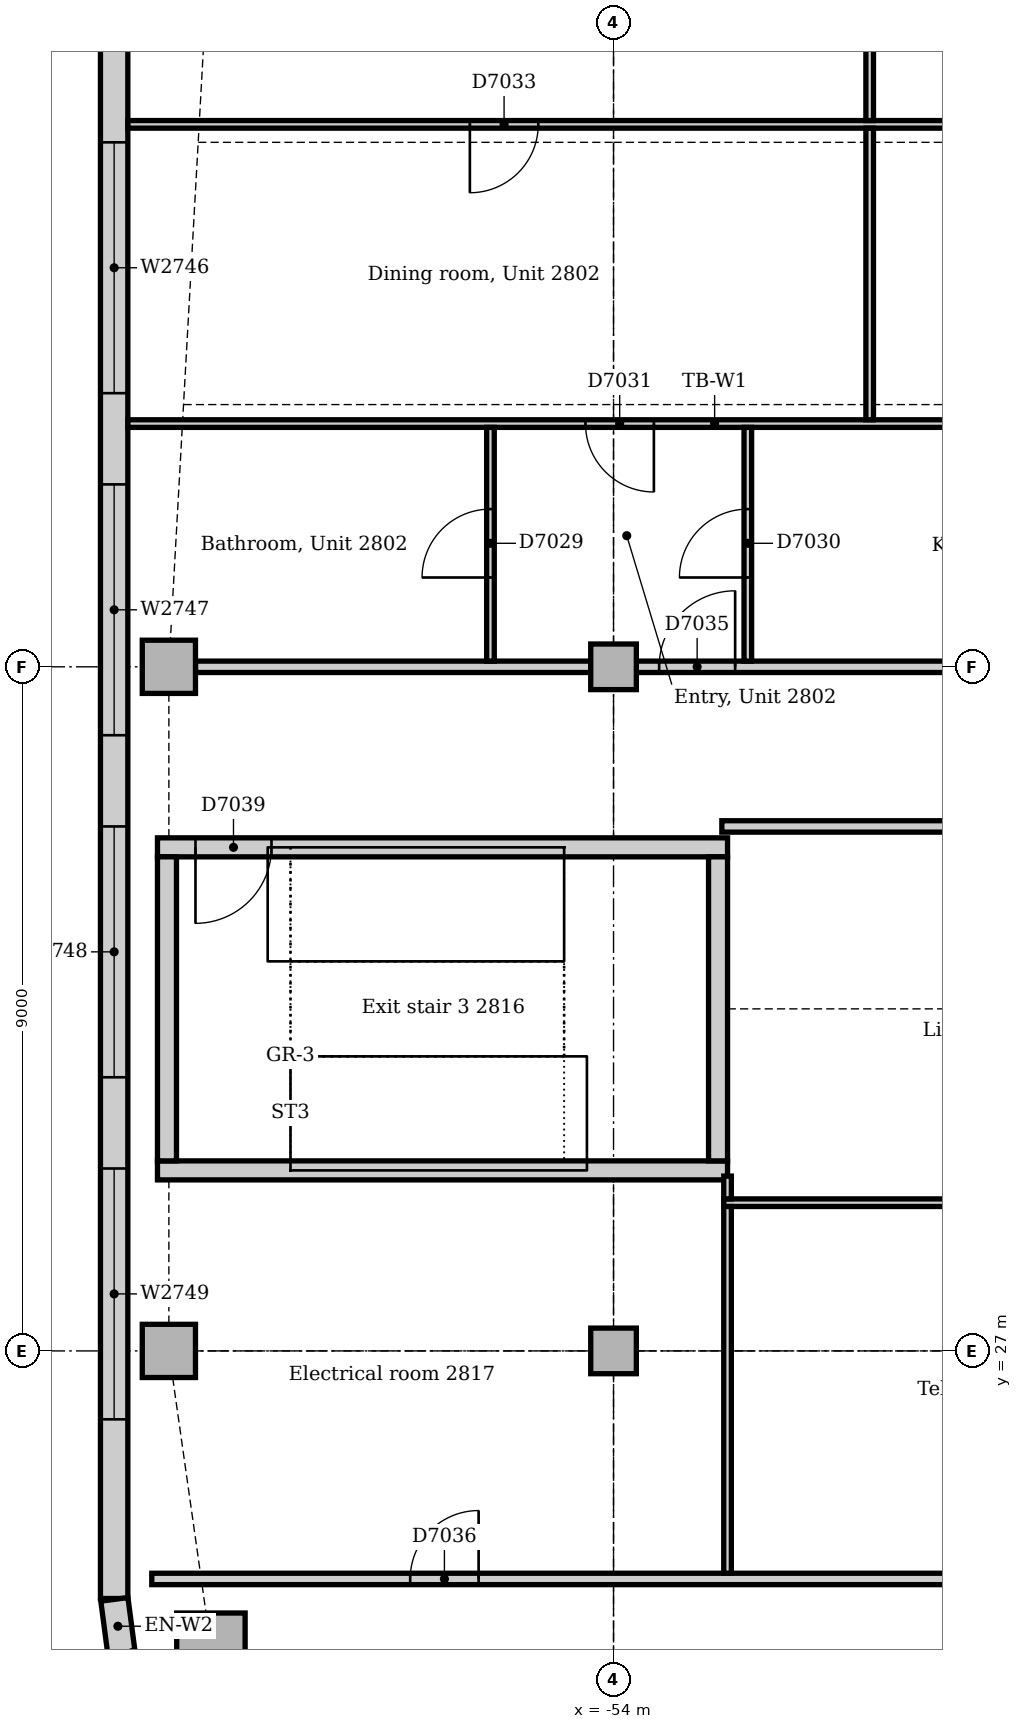
"""IFC4 building model, lengths in metres.
Left out: names, types, materials, properties, quantities, classifications, styles, units other than length and angle.
Written with IfcOpenShell. Run it as: python <this file> out.ifc"""

import sys

from ifc_helpers import new_model, si_unit, direction, frame, frame_2d, origin, origin_2d, place, context, subcontext, project, spatial, rectangle, extrude, element, fill, save


model = new_model("IFC4")
c1 = context("Model", 3, precision=1e-05, world=origin(), true_north=direction((0.0, 1.0)))
c2 = subcontext(c1, "Body", "Model", "MODEL_VIEW")
j1 = project(units=[si_unit("LENGTHUNIT", "METRE"), si_unit("PLANEANGLEUNIT", "RADIAN")], contexts=[c1])
p1 = place(None, origin())
s1 = spatial("IfcSite", under=j1, at=p1, CompositionType="ELEMENT")
p2 = place(p1, origin())
s2 = spatial("IfcBuilding", under=s1, at=p2, CompositionType="ELEMENT")
p3 = place(p2, frame((0.0, 0.0, 120.0)))
s3 = spatial("IfcBuildingStorey", under=s2, at=p3, CompositionType="ELEMENT", Elevation=120.0)
p4 = place(p3, frame((-60.0, 29.375, 0.0), z_axis=(0.0, 0.0, 1.0), x_axis=(1.0, 0.0, 0.0)))
e1 = element("IfcWall", 1, at=p4, inside=s3, PredefinedType="SOLIDWALL", context=c2, shape_type="SweptSolid", body=[
    extrude(rectangle(XDim=7.5, YDim=0.25, at=frame_2d((3.75, 0.0))), origin(), (0.0, 0.0, 1.0), 4.0),
])
p5 = place(p3, frame((-52.5, 33.625, 0.0), z_axis=(0.0, 0.0, 1.0), x_axis=(-1.0, 0.0, 0.0)))
e2 = element("IfcWall", 2, at=p5, inside=s3, PredefinedType="SOLIDWALL", context=c2, shape_type="SweptSolid", body=[
    extrude(rectangle(XDim=7.5, YDim=0.25, at=frame_2d((3.75, 0.0))), origin(), (0.0, 0.0, 1.0), 4.0),
])
p6 = place(p5, frame((6.0, 0.0, 0.0)))
e3 = element("IfcOpeningElement", 3, at=p6, cuts=e2, PredefinedType="OPENING", context=c2, shape_type="SweptSolid", body=[
    extrude(rectangle(XDim=1.0, YDim=2.1, at=frame_2d((0.5, 1.05))), frame((0.0, 0.135, 0.0), z_axis=(0.0, -1.0, 0.0), x_axis=(1.0, 0.0, 0.0)), (0.0, 0.0, 1.0), 0.27),
])
for number, where, z_axis, x_axis in (
    (4, (-52.625, 29.5, 0.0), (0.0, 0.0, 1.0), (0.0, 1.0, 0.0)),
    (5, (-59.875, 33.5, 0.0), (0.0, 0.0, 1.0), (0.0, -1.0, 0.0)),
):
    element("IfcWall", number, at=place(p3, frame(where, z_axis=z_axis, x_axis=x_axis)), inside=s3, PredefinedType="SOLIDWALL", context=c2, shape_type="SweptSolid", body=[
        extrude(rectangle(XDim=4.0, YDim=0.25, at=frame_2d((2.0, 0.0))), origin(), (0.0, 0.0, 1.0), 4.0),
    ])
p7 = place(p3, frame((-59.297, 23.102, 0.0), z_axis=(0.0, 0.0, 1.0), x_axis=(1.0, 0.0, 0.0)))
e6 = element("IfcColumn", 6, at=p7, inside=s3, PredefinedType="COLUMN", context=c2, shape_type="SweptSolid", body=[
    extrude(rectangle(XDim=0.9, YDim=0.9, at=origin_2d()), origin(), (0.0, 0.0, 1.0), 3.85),
])
for number, where, z_axis, x_axis in (
    (7, (-59.85, 27.0, 0.0), (0.0, 0.0, 1.0), (1.0, 0.0, 0.0)),
    (8, (-59.85, 36.0, 0.0), (0.0, 0.0, 1.0), (1.0, 0.0, 0.0)),
):
    element("IfcColumn", number, at=place(p3, frame(where, z_axis=z_axis, x_axis=x_axis)), inside=s3, PredefinedType="COLUMN", context=c2, shape_type="SweptSolid", body=[
        extrude(rectangle(XDim=0.7, YDim=0.7, at=origin_2d()), origin(), (0.0, 0.0, 1.0), 3.85),
    ])
for number, where, z_axis, x_axis in (
    (9, (-54.0, 27.0, 0.0), (0.0, 0.0, 1.0), (1.0, 0.0, 0.0)),
    (10, (-54.0, 36.0, 0.0), (0.0, 0.0, 1.0), (1.0, 0.0, 0.0)),
):
    element("IfcColumn", number, at=place(p3, frame(where, z_axis=z_axis, x_axis=x_axis)), inside=s3, PredefinedType="COLUMN", context=c2, shape_type="SweptSolid", body=[
        extrude(rectangle(XDim=0.6, YDim=0.6, at=origin_2d()), origin(), (0.0, 0.0, 1.0), 3.85),
    ])
p8 = place(p3, frame((-60.57, 45.257, 0.0), z_axis=(0.0, 0.0, 1.0), x_axis=(0.0, -1.0, 0.0)))
e11 = element("IfcWall", 11, at=p8, inside=s3, PredefinedType="STANDARD", context=c2, shape_type="SweptSolid", body=[
    extrude(rectangle(XDim=21.515, YDim=0.36, at=frame_2d((10.757, 0.0))), origin(), (0.0, 0.0, 1.0), 3.85),
])
p9 = place(p8, frame((2.357, 0.0, 0.9)))
e12 = element("IfcOpeningElement", 12, at=p9, cuts=e11, PredefinedType="OPENING", context=c2, shape_type="SweptSolid", body=[
    extrude(rectangle(XDim=3.3, YDim=1.6, at=frame_2d((1.65, 0.8))), frame((0.0, 0.19, 0.0), z_axis=(0.0, -1.0, 0.0), x_axis=(1.0, 0.0, 0.0)), (0.0, 0.0, 1.0), 0.38),
])
p10 = place(p8, frame((6.857, 0.0, 0.9)))
e13 = element("IfcOpeningElement", 13, at=p10, cuts=e11, PredefinedType="OPENING", context=c2, shape_type="SweptSolid", body=[
    extrude(rectangle(XDim=3.3, YDim=1.6, at=frame_2d((1.65, 0.8))), frame((0.0, 0.19, 0.0), z_axis=(0.0, -1.0, 0.0), x_axis=(1.0, 0.0, 0.0)), (0.0, 0.0, 1.0), 0.38),
])
p11 = place(p8, frame((11.357, 0.0, 0.9)))
e14 = element("IfcOpeningElement", 14, at=p11, cuts=e11, PredefinedType="OPENING", context=c2, shape_type="SweptSolid", body=[
    extrude(rectangle(XDim=3.3, YDim=1.6, at=frame_2d((1.65, 0.8))), frame((0.0, 0.19, 0.0), z_axis=(0.0, -1.0, 0.0), x_axis=(1.0, 0.0, 0.0)), (0.0, 0.0, 1.0), 0.38),
])
p12 = place(p8, frame((15.857, 0.0, 0.9)))
e15 = element("IfcOpeningElement", 15, at=p12, cuts=e11, PredefinedType="OPENING", context=c2, shape_type="SweptSolid", body=[
    extrude(rectangle(XDim=3.3, YDim=1.6, at=frame_2d((1.65, 0.8))), frame((0.0, 0.19, 0.0), z_axis=(0.0, -1.0, 0.0), x_axis=(1.0, 0.0, 0.0)), (0.0, 0.0, 1.0), 0.38),
])
p13 = place(p3, frame((-60.567, 23.731, 0.0), z_axis=(0.0, 0.0, 1.0), x_axis=(0.13055608231, -0.99144092581, 0.0)))
e16 = element("IfcWall", 16, at=p13, inside=s3, PredefinedType="STANDARD", context=c2, shape_type="SweptSolid", body=[
    extrude(rectangle(XDim=0.713, YDim=0.36, at=frame_2d((0.356, 0.0))), origin(), (0.0, 0.0, 1.0), 3.85),
])
p14 = place(p3, frame((-53.7, 36.0, 0.0), z_axis=(0.0, 0.0, 1.0), x_axis=(1.0, 0.0, 0.0)))
e17 = element("IfcWall", 17, at=p14, inside=s3, PredefinedType="PARTITIONING", context=c2, shape_type="SweptSolid", body=[
    extrude(rectangle(XDim=8.4, YDim=0.15, at=frame_2d((4.2, 0.0))), origin(), (0.0, 0.0, 1.0), 3.262),
])
p15 = place(p14, frame((0.3, 0.0, 0.0)))
e18 = element("IfcOpeningElement", 18, at=p15, cuts=e17, PredefinedType="OPENING", context=c2, shape_type="SweptSolid", body=[
    extrude(rectangle(XDim=1.0, YDim=2.1, at=frame_2d((0.5, 1.05))), frame((0.0, 0.085, 0.0), z_axis=(0.0, -1.0, 0.0), x_axis=(1.0, 0.0, 0.0)), (0.0, 0.0, 1.0), 0.17),
])
p16 = place(p3, frame((-59.5, 36.0, 0.0), z_axis=(0.0, 0.0, 1.0), x_axis=(1.0, 0.0, 0.0)))
e19 = element("IfcWall", 19, at=p16, inside=s3, PredefinedType="PARTITIONING", context=c2, shape_type="SweptSolid", body=[
    extrude(rectangle(XDim=5.2, YDim=0.15, at=frame_2d((2.6, 0.0))), origin(), (0.0, 0.0, 1.0), 3.35),
])
p17 = place(p3, frame((-60.075, 24.0, 0.0), z_axis=(0.0, 0.0, 1.0), x_axis=(1.0, 0.0, 0.0)))
e20 = element("IfcWall", 20, at=p17, inside=s3, PredefinedType="PARTITIONING", context=c2, shape_type="SweptSolid", body=[
    extrude(rectangle(XDim=15.15, YDim=0.15, at=frame_2d((7.575, 0.0))), origin(), (0.0, 0.0, 1.0), 3.85),
])
p18 = place(p17, frame((3.4, 0.0, 0.0)))
e21 = element("IfcOpeningElement", 21, at=p18, cuts=e20, PredefinedType="OPENING", context=c2, shape_type="SweptSolid", body=[
    extrude(rectangle(XDim=0.9, YDim=2.1, at=frame_2d((0.45, 1.05))), frame((0.0, 0.085, 0.0), z_axis=(0.0, -1.0, 0.0), x_axis=(1.0, 0.0, 0.0)), (0.0, 0.0, 1.0), 0.17),
])
p19 = place(p3, frame((-52.575, 33.9, 0.0), z_axis=(0.0, 0.0, 1.0), x_axis=(1.0, 0.0, 0.0)))
e22 = element("IfcWall", 22, at=p19, inside=s3, PredefinedType="PARTITIONING", context=c2, shape_type="SweptSolid", body=[
    extrude(rectangle(XDim=7.5, YDim=0.15, at=frame_2d((3.75, 0.0))), origin(), (0.0, 0.0, 1.0), 3.85),
])
p20 = place(p19, frame((3.3, 0.0, 0.0)))
e23 = element("IfcOpeningElement", 23, at=p20, cuts=e22, PredefinedType="OPENING", context=c2, shape_type="SweptSolid", body=[
    extrude(rectangle(XDim=0.9, YDim=2.1, at=frame_2d((0.45, 1.05))), frame((0.0, 0.085, 0.0), z_axis=(0.0, -1.0, 0.0), x_axis=(1.0, 0.0, 0.0)), (0.0, 0.0, 1.0), 0.17),
])
p21 = place(p3, frame((-60.39, 39.2, 0.0), z_axis=(0.0, 0.0, 1.0), x_axis=(1.0, 0.0, 0.0)))
e24 = element("IfcWall", 24, at=p21, inside=s3, PredefinedType="PARTITIONING", context=c2, shape_type="SweptSolid", body=[
    extrude(rectangle(XDim=15.44, YDim=0.1, at=frame_2d((7.72, 0.0))), origin(), (0.0, 0.0, 1.0), 3.85),
])
p22 = place(p21, frame((6.021, 0.0, 0.0)))
e25 = element("IfcOpeningElement", 25, at=p22, cuts=e24, PredefinedType="OPENING", context=c2, shape_type="SweptSolid", body=[
    extrude(rectangle(XDim=0.9, YDim=2.1, at=frame_2d((0.45, 1.05))), frame((0.0, 0.06, 0.0), z_axis=(0.0, -1.0, 0.0), x_axis=(1.0, 0.0, 0.0)), (0.0, 0.0, 1.0), 0.12),
])
p23 = place(p3, frame((-60.39, 43.136, 0.0), z_axis=(0.0, 0.0, 1.0), x_axis=(1.0, 0.0, 0.0)))
e26 = element("IfcWall", 26, at=p23, inside=s3, PredefinedType="PARTITIONING", context=c2, shape_type="SweptSolid", body=[
    extrude(rectangle(XDim=15.44, YDim=0.1, at=frame_2d((7.72, 0.0))), origin(), (0.0, 0.0, 1.0), 3.85),
])
p24 = place(p23, frame((4.5, 0.0, 0.0)))
e27 = element("IfcOpeningElement", 27, at=p24, cuts=e26, PredefinedType="OPENING", context=c2, shape_type="SweptSolid", body=[
    extrude(rectangle(XDim=0.9, YDim=2.1, at=frame_2d((0.45, 1.05))), frame((0.0, 0.06, 0.0), z_axis=(0.0, -1.0, 0.0), x_axis=(1.0, 0.0, 0.0)), (0.0, 0.0, 1.0), 0.12),
])
p25 = place(p23, frame((12.06, 0.0, 0.0)))
e28 = element("IfcOpeningElement", 28, at=p25, cuts=e26, PredefinedType="OPENING", context=c2, shape_type="SweptSolid", body=[
    extrude(rectangle(XDim=0.9, YDim=2.1, at=frame_2d((0.45, 1.05))), frame((0.0, 0.06, 0.0), z_axis=(0.0, -1.0, 0.0), x_axis=(1.0, 0.0, 0.0)), (0.0, 0.0, 1.0), 0.12),
])
p26 = place(p3, frame((-50.63, 39.25, 0.0), z_axis=(0.0, 0.0, 1.0), x_axis=(0.0, 1.0, 0.0)))
e29 = element("IfcWall", 29, at=p26, inside=s3, PredefinedType="PARTITIONING", context=c2, shape_type="SweptSolid", body=[
    extrude(rectangle(XDim=3.837, YDim=0.1, at=frame_2d((1.918, 0.0))), origin(), (0.0, 0.0, 1.0), 3.85),
])
p27 = place(p3, frame((-50.63, 43.187, 0.0), z_axis=(0.0, 0.0, 1.0), x_axis=(0.0, 1.0, 0.0)))
e30 = element("IfcWall", 30, at=p27, inside=s3, PredefinedType="PARTITIONING", context=c2, shape_type="SweptSolid", body=[
    extrude(rectangle(XDim=5.954, YDim=0.1, at=frame_2d((2.977, 0.0))), origin(), (0.0, 0.0, 1.0), 3.85),
])
p28 = place(p27, frame((2.55, 0.0, 0.0)))
e31 = element("IfcOpeningElement", 31, at=p28, cuts=e30, PredefinedType="OPENING", context=c2, shape_type="SweptSolid", body=[
    extrude(rectangle(XDim=0.9, YDim=2.1, at=frame_2d((0.45, 1.05))), frame((0.0, 0.06, 0.0), z_axis=(0.0, -1.0, 0.0), x_axis=(1.0, 0.0, 0.0)), (0.0, 0.0, 1.0), 0.12),
])
p29 = place(p3, frame((-52.55, 28.95, 0.0), z_axis=(0.0, 0.0, 1.0), x_axis=(1.0, 0.0, 0.0)))
e32 = element("IfcWall", 32, at=p29, inside=s3, PredefinedType="PARTITIONING", context=c2, shape_type="SweptSolid", body=[
    extrude(rectangle(XDim=7.475, YDim=0.1, at=frame_2d((3.737, 0.0))), origin(), (0.0, 0.0, 1.0), 3.85),
])
p30 = place(p3, frame((-52.5, 29.0, 0.0), z_axis=(0.0, 0.0, 1.0), x_axis=(0.0, 1.0, 0.0)))
e33 = element("IfcWall", 33, at=p30, inside=s3, PredefinedType="PARTITIONING", context=c2, shape_type="SweptSolid", body=[
    extrude(rectangle(XDim=0.3, YDim=0.1, at=frame_2d((0.15, 0.0))), origin(), (0.0, 0.0, 1.0), 3.85),
])
p31 = place(p3, frame((-52.5, 24.075, 0.0), z_axis=(0.0, 0.0, 1.0), x_axis=(0.0, 1.0, 0.0)))
e34 = element("IfcWall", 34, at=p31, inside=s3, PredefinedType="PARTITIONING", context=c2, shape_type="SweptSolid", body=[
    extrude(rectangle(XDim=4.825, YDim=0.1, at=frame_2d((2.413, 0.0))), origin(), (0.0, 0.0, 1.0), 3.85),
])
p32 = place(p3, frame((-55.619, 36.075, 0.0), z_axis=(0.0, 0.0, 1.0), x_axis=(0.0, 1.0, 0.0)))
e35 = element("IfcWall", 35, at=p32, inside=s3, PredefinedType="PARTITIONING", context=c2, shape_type="SweptSolid", body=[
    extrude(rectangle(XDim=3.075, YDim=0.1, at=frame_2d((1.538, 0.0))), origin(), (0.0, 0.0, 1.0), 3.85),
])
p33 = place(p32, frame((1.1, 0.0, 0.0)))
e36 = element("IfcOpeningElement", 36, at=p33, cuts=e35, PredefinedType="OPENING", context=c2, shape_type="SweptSolid", body=[
    extrude(rectangle(XDim=0.9, YDim=2.1, at=frame_2d((0.45, 1.05))), frame((0.0, 0.06, 0.0), z_axis=(0.0, -1.0, 0.0), x_axis=(1.0, 0.0, 0.0)), (0.0, 0.0, 1.0), 0.12),
])
p34 = place(p3, frame((-52.233, 36.075, 0.0), z_axis=(0.0, 0.0, 1.0), x_axis=(0.0, 1.0, 0.0)))
e37 = element("IfcWall", 37, at=p34, inside=s3, PredefinedType="PARTITIONING", context=c2, shape_type="SweptSolid", body=[
    extrude(rectangle(XDim=3.075, YDim=0.1, at=frame_2d((1.538, 0.0))), origin(), (0.0, 0.0, 1.0), 3.85),
])
p35 = place(p34, frame((1.1, 0.0, 0.0)))
e38 = element("IfcOpeningElement", 38, at=p35, cuts=e37, PredefinedType="OPENING", context=c2, shape_type="SweptSolid", body=[
    extrude(rectangle(XDim=0.9, YDim=2.1, at=frame_2d((0.45, 1.05))), frame((0.0, 0.06, 0.0), z_axis=(0.0, -1.0, 0.0), x_axis=(1.0, 0.0, 0.0)), (0.0, 0.0, 1.0), 0.12),
])
p36 = place(p9, origin())
e39 = element("IfcWindow", 39, at=p36, inside=s3, PartitioningType="SINGLE_PANEL", PredefinedType="WINDOW", context=c2, shape_type="SweptSolid", body=[
    extrude(rectangle(XDim=3.3, YDim=1.6, at=frame_2d((1.65, 0.8))), frame((0.0, 0.13, 0.0), z_axis=(0.0, -1.0, 0.0), x_axis=(1.0, 0.0, 0.0)), (0.0, 0.0, 1.0), 0.06),
])
fill(e12, e39)
p37 = place(p10, origin())
e40 = element("IfcWindow", 40, at=p37, inside=s3, PartitioningType="SINGLE_PANEL", PredefinedType="WINDOW", context=c2, shape_type="SweptSolid", body=[
    extrude(rectangle(XDim=3.3, YDim=1.6, at=frame_2d((1.65, 0.8))), frame((0.0, 0.13, 0.0), z_axis=(0.0, -1.0, 0.0), x_axis=(1.0, 0.0, 0.0)), (0.0, 0.0, 1.0), 0.06),
])
fill(e13, e40)
p38 = place(p11, origin())
e41 = element("IfcWindow", 41, at=p38, inside=s3, PartitioningType="SINGLE_PANEL", PredefinedType="WINDOW", context=c2, shape_type="SweptSolid", body=[
    extrude(rectangle(XDim=3.3, YDim=1.6, at=frame_2d((1.65, 0.8))), frame((0.0, 0.13, 0.0), z_axis=(0.0, -1.0, 0.0), x_axis=(1.0, 0.0, 0.0)), (0.0, 0.0, 1.0), 0.06),
])
fill(e14, e41)
p39 = place(p12, origin())
e42 = element("IfcWindow", 42, at=p39, inside=s3, PartitioningType="SINGLE_PANEL", PredefinedType="WINDOW", context=c2, shape_type="SweptSolid", body=[
    extrude(rectangle(XDim=3.3, YDim=1.6, at=frame_2d((1.65, 0.8))), frame((0.0, 0.13, 0.0), z_axis=(0.0, -1.0, 0.0), x_axis=(1.0, 0.0, 0.0)), (0.0, 0.0, 1.0), 0.06),
])
fill(e15, e42)
p40 = place(p33, origin())
e43 = element("IfcDoor", 43, at=p40, inside=s3, OperationType="SINGLE_SWING_LEFT", PredefinedType="DOOR", context=c2, shape_type="SweptSolid", body=[
    extrude(rectangle(XDim=0.9, YDim=2.1, at=frame_2d((0.45, 1.05))), frame((0.0, 0.025, 0.0), z_axis=(0.0, -1.0, 0.0), x_axis=(1.0, 0.0, 0.0)), (0.0, 0.0, 1.0), 0.05),
])
fill(e36, e43)
p41 = place(p35, origin())
e44 = element("IfcDoor", 44, at=p41, inside=s3, OperationType="SINGLE_SWING_LEFT", PredefinedType="DOOR", context=c2, shape_type="SweptSolid", body=[
    extrude(rectangle(XDim=0.9, YDim=2.1, at=frame_2d((0.45, 1.05))), frame((0.0, 0.025, 0.0), z_axis=(0.0, -1.0, 0.0), x_axis=(1.0, 0.0, 0.0)), (0.0, 0.0, 1.0), 0.05),
])
fill(e38, e44)
p42 = place(p22, frame((0.9, 0.0, 0.0), z_axis=(0.0, 0.0, 1.0), x_axis=(-1.0, 0.0, 0.0)))
e45 = element("IfcDoor", 45, at=p42, inside=s3, OperationType="SINGLE_SWING_LEFT", PredefinedType="DOOR", context=c2, shape_type="SweptSolid", body=[
    extrude(rectangle(XDim=0.9, YDim=2.1, at=frame_2d((0.45, 1.05))), frame((0.0, 0.025, 0.0), z_axis=(0.0, -1.0, 0.0), x_axis=(1.0, 0.0, 0.0)), (0.0, 0.0, 1.0), 0.05),
])
fill(e25, e45)
p43 = place(p24, frame((0.9, 0.0, 0.0), z_axis=(0.0, 0.0, 1.0), x_axis=(-1.0, 0.0, 0.0)))
e46 = element("IfcDoor", 46, at=p43, inside=s3, OperationType="SINGLE_SWING_RIGHT", PredefinedType="DOOR", context=c2, shape_type="SweptSolid", body=[
    extrude(rectangle(XDim=0.9, YDim=2.1, at=frame_2d((0.45, 1.05))), frame((0.0, 0.025, 0.0), z_axis=(0.0, -1.0, 0.0), x_axis=(1.0, 0.0, 0.0)), (0.0, 0.0, 1.0), 0.05),
])
fill(e27, e46)
p44 = place(p15, origin())
e47 = element("IfcDoor", 47, at=p44, inside=s3, OperationType="SINGLE_SWING_RIGHT", PredefinedType="DOOR", context=c2, shape_type="SweptSolid", body=[
    extrude(rectangle(XDim=1.0, YDim=2.1, at=frame_2d((0.5, 1.05))), frame((0.0, 0.025, 0.0), z_axis=(0.0, -1.0, 0.0), x_axis=(1.0, 0.0, 0.0)), (0.0, 0.0, 1.0), 0.05),
])
fill(e18, e47)
p45 = place(p18, origin())
e48 = element("IfcDoor", 48, at=p45, inside=s3, OperationType="SINGLE_SWING_RIGHT", PredefinedType="DOOR", context=c2, shape_type="SweptSolid", body=[
    extrude(rectangle(XDim=0.9, YDim=2.1, at=frame_2d((0.45, 1.05))), frame((0.0, 0.025, 0.0), z_axis=(0.0, -1.0, 0.0), x_axis=(1.0, 0.0, 0.0)), (0.0, 0.0, 1.0), 0.05),
])
fill(e21, e48)
p46 = place(p6, origin())
e49 = element("IfcDoor", 49, at=p46, inside=s3, OperationType="SINGLE_SWING_RIGHT", PredefinedType="DOOR", context=c2, shape_type="SweptSolid", body=[
    extrude(rectangle(XDim=1.0, YDim=2.1, at=frame_2d((0.5, 1.05))), frame((0.0, 0.025, 0.0), z_axis=(0.0, -1.0, 0.0), x_axis=(1.0, 0.0, 0.0)), (0.0, 0.0, 1.0), 0.05),
])
fill(e3, e49)
save(model, sys.argv[1])
